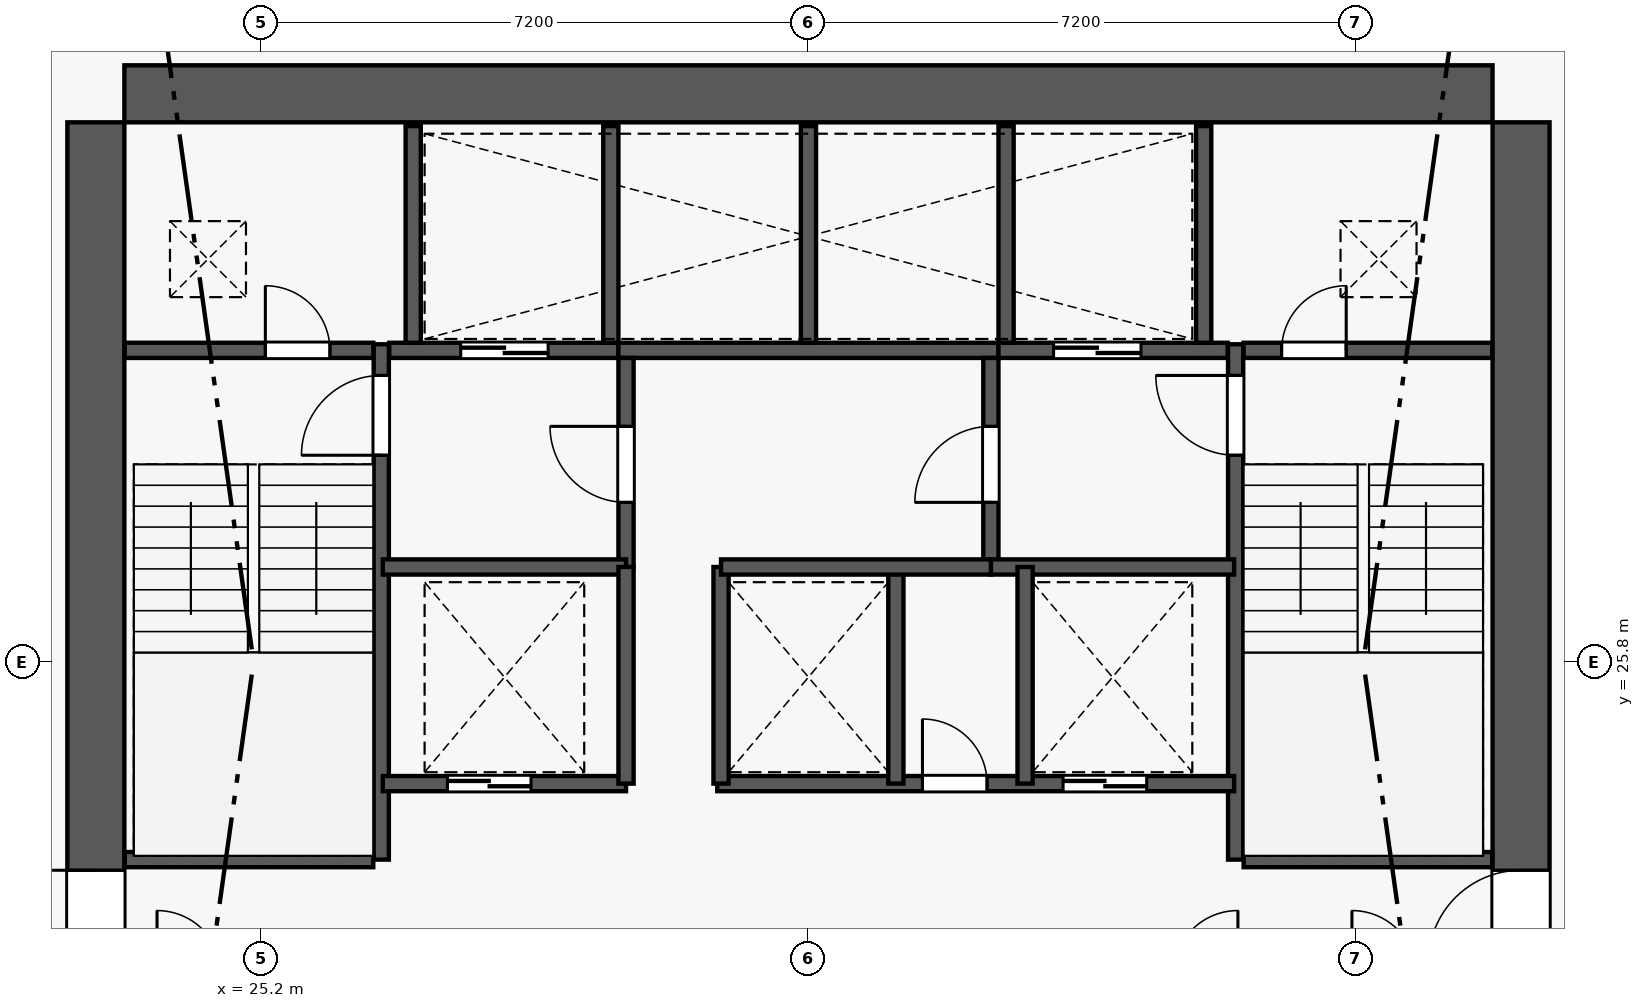
"""IFC4 building model, lengths in metres.
Left out: names, types, materials, properties, quantities, classifications, styles, units other than length and angle.
Written with IfcOpenShell. Run it as: python <this file> out.ifc"""

import sys

from ifc_helpers import new_model, si_unit, direction, frame, frame_2d, origin, origin_2d, place, context, subcontext, project, spatial, rectangle, extrude, element, fill, save


model = new_model("IFC4")
c1 = context("Model", 3, precision=1e-05, world=origin(), true_north=direction((0.0, 1.0)))
c2 = subcontext(c1, "Body", "Model", "MODEL_VIEW")
j1 = project(units=[si_unit("LENGTHUNIT", "METRE"), si_unit("PLANEANGLEUNIT", "RADIAN")], contexts=[c1])
p1 = place(None, origin())
s1 = spatial("IfcSite", under=j1, at=p1, CompositionType="ELEMENT")
p2 = place(p1, origin())
s2 = spatial("IfcBuilding", under=s1, at=p2, CompositionType="ELEMENT")
p3 = place(p2, frame((0.0, 0.0, 112.6)))
s3 = spatial("IfcBuildingStorey", under=s2, at=p3, CompositionType="ELEMENT", Elevation=112.6)
for number, where, z_axis, x_axis in (
    (1, (41.775, 33.275, 0.0), (0.0, 0.0, 1.0), (1.0, 0.0, 0.0)),
    (2, (23.025, 33.275, 0.0), (0.0, 0.0, 1.0), (1.0, 0.0, 0.0)),
):
    element("IfcColumn", number, at=place(p3, frame(where, z_axis=z_axis, x_axis=x_axis)), inside=s3, PredefinedType="COLUMN", context=c2, shape_type="SweptSolid", body=[
        extrude(rectangle(XDim=0.75, YDim=0.75, at=origin_2d()), origin(), (0.0, 0.0, 1.0), 3.55),
    ])
p4 = place(p3, frame((23.4, 33.275, 0.0), z_axis=(0.0, 0.0, 1.0), x_axis=(1.0, 0.0, 0.0)))
e3 = element("IfcWall", 3, at=p4, inside=s3, PredefinedType="SHEAR", context=c2, shape_type="SweptSolid", body=[
    extrude(rectangle(XDim=18.0, YDim=0.75, at=frame_2d((9.0, 0.0))), origin(), (0.0, 0.0, 1.0), 3.34),
])
p5 = place(p3, frame((23.025, 18.9, 0.0), z_axis=(0.0, 0.0, 1.0), x_axis=(0.0, 1.0, 0.0)))
e4 = element("IfcWall", 4, at=p5, inside=s3, PredefinedType="SHEAR", context=c2, shape_type="SweptSolid", body=[
    extrude(rectangle(XDim=14.0, YDim=0.75, at=frame_2d((7.0, 0.0))), origin(), (0.0, 0.0, 1.0), 3.34),
])
p6 = place(p5, frame((2.94, 0.0, 0.0)))
e5 = element("IfcOpeningElement", 5, at=p6, cuts=e4, PredefinedType="OPENING", context=c2, shape_type="SweptSolid", body=[
    extrude(rectangle(XDim=1.22, YDim=2.25, at=frame_2d((0.61, 1.125))), frame((0.0, 0.385, 0.0), z_axis=(0.0, -1.0, 0.0), x_axis=(1.0, 0.0, 0.0)), (0.0, 0.0, 1.0), 0.77),
])
p7 = place(p3, frame((41.775, 18.9, 0.0), z_axis=(0.0, 0.0, 1.0), x_axis=(0.0, 1.0, 0.0)))
e6 = element("IfcWall", 6, at=p7, inside=s3, PredefinedType="SHEAR", context=c2, shape_type="SweptSolid", body=[
    extrude(rectangle(XDim=14.0, YDim=0.75, at=frame_2d((7.0, 0.0))), origin(), (0.0, 0.0, 1.0), 3.34),
])
p8 = place(p7, frame((2.94, 0.0, 0.0)))
e7 = element("IfcOpeningElement", 7, at=p8, cuts=e6, PredefinedType="OPENING", context=c2, shape_type="SweptSolid", body=[
    extrude(rectangle(XDim=1.22, YDim=2.25, at=frame_2d((0.61, 1.125))), frame((0.0, 0.385, 0.0), z_axis=(0.0, -1.0, 0.0), x_axis=(1.0, 0.0, 0.0)), (0.0, 0.0, 1.0), 0.77),
])
p9 = place(p3, frame((26.78, 23.2, 0.0), z_axis=(0.0, 0.0, 1.0), x_axis=(0.0, 1.0, 0.0)))
e8 = element("IfcWall", 8, at=p9, inside=s3, PredefinedType="SHEAR", context=c2, shape_type="SweptSolid", body=[
    extrude(rectangle(XDim=6.78, YDim=0.2, at=frame_2d((3.39, 0.0))), origin(), (0.0, 0.0, 1.0), 3.55),
])
p10 = place(p9, frame((5.32, 0.0, 0.0)))
e9 = element("IfcOpeningElement", 9, at=p10, cuts=e8, PredefinedType="OPENING", context=c2, shape_type="SweptSolid", body=[
    extrude(rectangle(XDim=1.05, YDim=2.15, at=frame_2d((0.525, 1.075))), frame((0.0, 0.11, 0.0), z_axis=(0.0, -1.0, 0.0), x_axis=(1.0, 0.0, 0.0)), (0.0, 0.0, 1.0), 0.22),
])
p11 = place(p3, frame((23.405, 23.2, 0.0), z_axis=(0.0, 0.0, 1.0), x_axis=(1.0, 0.0, 0.0)))
e10 = element("IfcWall", 10, at=p11, inside=s3, PredefinedType="PLUMBINGWALL", context=c2, shape_type="SweptSolid", body=[
    extrude(rectangle(XDim=3.27, YDim=0.2, at=frame_2d((1.635, 0.0))), origin(), (0.0, 0.0, 1.0), 3.34),
])
p12 = place(p3, frame((38.02, 23.2, 0.0), z_axis=(0.0, 0.0, 1.0), x_axis=(0.0, 1.0, 0.0)))
e11 = element("IfcWall", 11, at=p12, inside=s3, PredefinedType="SHEAR", context=c2, shape_type="SweptSolid", body=[
    extrude(rectangle(XDim=6.78, YDim=0.2, at=frame_2d((3.39, 0.0))), origin(), (0.0, 0.0, 1.0), 3.55),
])
p13 = place(p12, frame((5.32, 0.0, 0.0)))
e12 = element("IfcOpeningElement", 12, at=p13, cuts=e11, PredefinedType="OPENING", context=c2, shape_type="SweptSolid", body=[
    extrude(rectangle(XDim=1.05, YDim=2.15, at=frame_2d((0.525, 1.075))), frame((0.0, 0.11, 0.0), z_axis=(0.0, -1.0, 0.0), x_axis=(1.0, 0.0, 0.0)), (0.0, 0.0, 1.0), 0.22),
])
p14 = place(p3, frame((38.125, 23.2, 0.0), z_axis=(0.0, 0.0, 1.0), x_axis=(1.0, 0.0, 0.0)))
e13 = element("IfcWall", 13, at=p14, inside=s3, PredefinedType="PLUMBINGWALL", context=c2, shape_type="SweptSolid", body=[
    extrude(rectangle(XDim=3.27, YDim=0.2, at=frame_2d((1.635, 0.0))), origin(), (0.0, 0.0, 1.0), 3.34),
])
p15 = place(p3, frame((23.405, 29.9, 0.0), z_axis=(0.0, 0.0, 1.0), x_axis=(1.0, 0.0, 0.0)))
e14 = element("IfcWall", 14, at=p15, inside=s3, PredefinedType="PLUMBINGWALL", context=c2, shape_type="SweptSolid", body=[
    extrude(rectangle(XDim=3.27, YDim=0.2, at=frame_2d((1.635, 0.0))), origin(), (0.0, 0.0, 1.0), 3.34),
])
p16 = place(p15, frame((1.85, 0.0, 0.0)))
e15 = element("IfcOpeningElement", 15, at=p16, cuts=e14, PredefinedType="OPENING", context=c2, shape_type="SweptSolid", body=[
    extrude(rectangle(XDim=0.85, YDim=2.05, at=frame_2d((0.425, 1.025))), frame((0.0, 0.11, 0.0), z_axis=(0.0, -1.0, 0.0), x_axis=(1.0, 0.0, 0.0)), (0.0, 0.0, 1.0), 0.22),
])
p17 = place(p3, frame((26.885, 29.9, 0.0), z_axis=(0.0, 0.0, 1.0), x_axis=(1.0, 0.0, 0.0)))
e16 = element("IfcWall", 16, at=p17, inside=s3, PredefinedType="PLUMBINGWALL", context=c2, shape_type="SweptSolid", body=[
    extrude(rectangle(XDim=3.015, YDim=0.2, at=frame_2d((1.507, 0.0))), origin(), (0.0, 0.0, 1.0), 3.34),
])
p18 = place(p17, frame((0.94, 0.0, 0.0)))
e17 = element("IfcOpeningElement", 17, at=p18, cuts=e16, PredefinedType="OPENING", context=c2, shape_type="SweptSolid", body=[
    extrude(rectangle(XDim=1.15, YDim=2.2, at=frame_2d((0.575, 1.1))), frame((0.0, 0.11, 0.0), z_axis=(0.0, -1.0, 0.0), x_axis=(1.0, 0.0, 0.0)), (0.0, 0.0, 1.0), 0.22),
])
p19 = place(p3, frame((29.9, 29.9, 0.0), z_axis=(0.0, 0.0, 1.0), x_axis=(1.0, 0.0, 0.0)))
e18 = element("IfcWall", 18, at=p19, inside=s3, PredefinedType="PLUMBINGWALL", context=c2, shape_type="SweptSolid", body=[
    extrude(rectangle(XDim=5.0, YDim=0.2, at=frame_2d((2.5, 0.0))), origin(), (0.0, 0.0, 1.0), 3.34),
])
p20 = place(p3, frame((34.9, 29.9, 0.0), z_axis=(0.0, 0.0, 1.0), x_axis=(1.0, 0.0, 0.0)))
e19 = element("IfcWall", 19, at=p20, inside=s3, PredefinedType="PLUMBINGWALL", context=c2, shape_type="SweptSolid", body=[
    extrude(rectangle(XDim=3.015, YDim=0.2, at=frame_2d((1.508, 0.0))), origin(), (0.0, 0.0, 1.0), 3.34),
])
p21 = place(p20, frame((0.725, 0.0, 0.0)))
e20 = element("IfcOpeningElement", 20, at=p21, cuts=e19, PredefinedType="OPENING", context=c2, shape_type="SweptSolid", body=[
    extrude(rectangle(XDim=1.15, YDim=2.2, at=frame_2d((0.575, 1.1))), frame((0.0, 0.11, 0.0), z_axis=(0.0, -1.0, 0.0), x_axis=(1.0, 0.0, 0.0)), (0.0, 0.0, 1.0), 0.22),
])
p22 = place(p3, frame((38.125, 29.9, 0.0), z_axis=(0.0, 0.0, 1.0), x_axis=(1.0, 0.0, 0.0)))
e21 = element("IfcWall", 21, at=p22, inside=s3, PredefinedType="PLUMBINGWALL", context=c2, shape_type="SweptSolid", body=[
    extrude(rectangle(XDim=3.27, YDim=0.2, at=frame_2d((1.635, 0.0))), origin(), (0.0, 0.0, 1.0), 3.34),
])
p23 = place(p22, frame((0.5, 0.0, 0.0)))
e22 = element("IfcOpeningElement", 22, at=p23, cuts=e21, PredefinedType="OPENING", context=c2, shape_type="SweptSolid", body=[
    extrude(rectangle(XDim=0.85, YDim=2.05, at=frame_2d((0.425, 1.025))), frame((0.0, 0.11, 0.0), z_axis=(0.0, -1.0, 0.0), x_axis=(1.0, 0.0, 0.0)), (0.0, 0.0, 1.0), 0.22),
])
for number, where, z_axis, x_axis in (
    (23, (27.2, 30.0, 0.0), (0.0, 0.0, 1.0), (0.0, 1.0, 0.0)),
    (24, (29.8, 30.0, 0.0), (0.0, 0.0, 1.0), (0.0, 1.0, 0.0)),
    (25, (32.4, 30.0, 0.0), (0.0, 0.0, 1.0), (0.0, 1.0, 0.0)),
    (26, (35.0, 30.0, 0.0), (0.0, 0.0, 1.0), (0.0, 1.0, 0.0)),
    (27, (37.6, 30.0, 0.0), (0.0, 0.0, 1.0), (0.0, 1.0, 0.0)),
):
    element("IfcWall", number, at=place(p3, frame(where, z_axis=z_axis, x_axis=x_axis)), inside=s3, PredefinedType="PLUMBINGWALL", context=c2, shape_type="SweptSolid", body=[
        extrude(rectangle(XDim=2.85, YDim=0.2, at=frame_2d((1.425, 0.0))), origin(), (0.0, 0.0, 1.0), 3.34),
    ])
p24 = place(p3, frame((30.0, 27.05, 0.0), z_axis=(0.0, 0.0, 1.0), x_axis=(0.0, 1.0, 0.0)))
e28 = element("IfcWall", 28, at=p24, inside=s3, PredefinedType="PLUMBINGWALL", context=c2, shape_type="SweptSolid", body=[
    extrude(rectangle(XDim=2.75, YDim=0.2, at=frame_2d((1.375, 0.0))), origin(), (0.0, 0.0, 1.0), 3.34),
])
p25 = place(p24, frame((0.85, 0.0, 0.0)))
e29 = element("IfcOpeningElement", 29, at=p25, cuts=e28, PredefinedType="OPENING", context=c2, shape_type="SweptSolid", body=[
    extrude(rectangle(XDim=1.0, YDim=2.15, at=frame_2d((0.5, 1.075))), frame((0.0, 0.11, 0.0), z_axis=(0.0, -1.0, 0.0), x_axis=(1.0, 0.0, 0.0)), (0.0, 0.0, 1.0), 0.22),
])
p26 = place(p3, frame((26.8, 27.05, 0.0), z_axis=(0.0, 0.0, 1.0), x_axis=(1.0, 0.0, 0.0)))
e30 = element("IfcWall", 30, at=p26, inside=s3, PredefinedType="PLUMBINGWALL", context=c2, shape_type="SweptSolid", body=[
    extrude(rectangle(XDim=3.2, YDim=0.2, at=frame_2d((1.6, 0.0))), origin(), (0.0, 0.0, 1.0), 3.34),
])
p27 = place(p3, frame((34.8, 27.05, 0.0), z_axis=(0.0, 0.0, 1.0), x_axis=(0.0, 1.0, 0.0)))
e31 = element("IfcWall", 31, at=p27, inside=s3, PredefinedType="PLUMBINGWALL", context=c2, shape_type="SweptSolid", body=[
    extrude(rectangle(XDim=2.75, YDim=0.2, at=frame_2d((1.375, 0.0))), origin(), (0.0, 0.0, 1.0), 3.34),
])
p28 = place(p27, frame((0.85, 0.0, 0.0)))
e32 = element("IfcOpeningElement", 32, at=p28, cuts=e31, PredefinedType="OPENING", context=c2, shape_type="SweptSolid", body=[
    extrude(rectangle(XDim=1.0, YDim=2.15, at=frame_2d((0.5, 1.075))), frame((0.0, 0.11, 0.0), z_axis=(0.0, -1.0, 0.0), x_axis=(1.0, 0.0, 0.0)), (0.0, 0.0, 1.0), 0.22),
])
p29 = place(p3, frame((34.8, 27.05, 0.0), z_axis=(0.0, 0.0, 1.0), x_axis=(1.0, 0.0, 0.0)))
e33 = element("IfcWall", 33, at=p29, inside=s3, PredefinedType="PLUMBINGWALL", context=c2, shape_type="SweptSolid", body=[
    extrude(rectangle(XDim=3.2, YDim=0.2, at=frame_2d((1.6, 0.0))), origin(), (0.0, 0.0, 1.0), 3.34),
])
p30 = place(p3, frame((26.8, 24.2, 0.0), z_axis=(0.0, 0.0, 1.0), x_axis=(1.0, 0.0, 0.0)))
e34 = element("IfcWall", 34, at=p30, inside=s3, PredefinedType="PLUMBINGWALL", context=c2, shape_type="SweptSolid", body=[
    extrude(rectangle(XDim=3.2, YDim=0.2, at=frame_2d((1.6, 0.0))), origin(), (0.0, 0.0, 1.0), 3.34),
])
p31 = place(p30, frame((0.85, 0.0, 0.0)))
e35 = element("IfcOpeningElement", 35, at=p31, cuts=e34, PredefinedType="OPENING", context=c2, shape_type="SweptSolid", body=[
    extrude(rectangle(XDim=1.1, YDim=2.2, at=frame_2d((0.55, 1.1))), frame((0.0, 0.11, 0.0), z_axis=(0.0, -1.0, 0.0), x_axis=(1.0, 0.0, 0.0)), (0.0, 0.0, 1.0), 0.22),
])
p32 = place(p3, frame((30.0, 24.2, 0.0), z_axis=(0.0, 0.0, 1.0), x_axis=(0.0, 1.0, 0.0)))
e36 = element("IfcWall", 36, at=p32, inside=s3, PredefinedType="PLUMBINGWALL", context=c2, shape_type="SweptSolid", body=[
    extrude(rectangle(XDim=2.85, YDim=0.2, at=frame_2d((1.425, 0.0))), origin(), (0.0, 0.0, 1.0), 3.34),
])
p33 = place(p3, frame((31.2, 24.2, 0.0), z_axis=(0.0, 0.0, 1.0), x_axis=(1.0, 0.0, 0.0)))
e37 = element("IfcWall", 37, at=p33, inside=s3, PredefinedType="PLUMBINGWALL", context=c2, shape_type="SweptSolid", body=[
    extrude(rectangle(XDim=6.8, YDim=0.2, at=frame_2d((3.4, 0.0))), origin(), (0.0, 0.0, 1.0), 3.34),
])
p34 = place(p33, frame((2.7, 0.0, 0.0)))
e38 = element("IfcOpeningElement", 38, at=p34, cuts=e37, PredefinedType="OPENING", context=c2, shape_type="SweptSolid", body=[
    extrude(rectangle(XDim=0.85, YDim=2.05, at=frame_2d((0.425, 1.025))), frame((0.0, 0.11, 0.0), z_axis=(0.0, -1.0, 0.0), x_axis=(1.0, 0.0, 0.0)), (0.0, 0.0, 1.0), 0.22),
])
p35 = place(p33, frame((4.55, 0.0, 0.0)))
e39 = element("IfcOpeningElement", 39, at=p35, cuts=e37, PredefinedType="OPENING", context=c2, shape_type="SweptSolid", body=[
    extrude(rectangle(XDim=1.1, YDim=2.2, at=frame_2d((0.55, 1.1))), frame((0.0, 0.11, 0.0), z_axis=(0.0, -1.0, 0.0), x_axis=(1.0, 0.0, 0.0)), (0.0, 0.0, 1.0), 0.22),
])
for number, where, z_axis, x_axis in (
    (40, (31.25, 24.2, 0.0), (0.0, 0.0, 1.0), (0.0, 1.0, 0.0)),
    (41, (33.55, 24.2, 0.0), (0.0, 0.0, 1.0), (0.0, 1.0, 0.0)),
    (42, (35.25, 24.2, 0.0), (0.0, 0.0, 1.0), (0.0, 1.0, 0.0)),
):
    element("IfcWall", number, at=place(p3, frame(where, z_axis=z_axis, x_axis=x_axis)), inside=s3, PredefinedType="PLUMBINGWALL", context=c2, shape_type="SweptSolid", body=[
        extrude(rectangle(XDim=2.85, YDim=0.2, at=frame_2d((1.425, 0.0))), origin(), (0.0, 0.0, 1.0), 3.34),
    ])
p36 = place(p3, frame((31.25, 27.05, 0.0), z_axis=(0.0, 0.0, 1.0), x_axis=(1.0, 0.0, 0.0)))
e43 = element("IfcWall", 43, at=p36, inside=s3, PredefinedType="PLUMBINGWALL", context=c2, shape_type="SweptSolid", body=[
    extrude(rectangle(XDim=3.55, YDim=0.2, at=frame_2d((1.775, 0.0))), origin(), (0.0, 0.0, 1.0), 3.34),
])
p37 = place(p6, origin())
e44 = element("IfcDoor", 44, at=p37, inside=s3, OperationType="SINGLE_SWING_RIGHT", PredefinedType="DOOR", context=c2, shape_type="SweptSolid", body=[
    extrude(rectangle(XDim=1.22, YDim=2.25, at=frame_2d((0.61, 1.125))), frame((0.0, 0.025, 0.0), z_axis=(0.0, -1.0, 0.0), x_axis=(1.0, 0.0, 0.0)), (0.0, 0.0, 1.0), 0.05),
])
fill(e5, e44)
p38 = place(p8, origin())
e45 = element("IfcDoor", 45, at=p38, inside=s3, OperationType="SINGLE_SWING_LEFT", PredefinedType="DOOR", context=c2, shape_type="SweptSolid", body=[
    extrude(rectangle(XDim=1.22, YDim=2.25, at=frame_2d((0.61, 1.125))), frame((0.0, 0.025, 0.0), z_axis=(0.0, -1.0, 0.0), x_axis=(1.0, 0.0, 0.0)), (0.0, 0.0, 1.0), 0.05),
])
fill(e7, e45)
p39 = place(p10, origin())
e46 = element("IfcDoor", 46, at=p39, inside=s3, OperationType="SINGLE_SWING_LEFT", PredefinedType="DOOR", context=c2, shape_type="SweptSolid", body=[
    extrude(rectangle(XDim=1.05, YDim=2.15, at=frame_2d((0.525, 1.075))), frame((0.0, 0.025, 0.0), z_axis=(0.0, -1.0, 0.0), x_axis=(1.0, 0.0, 0.0)), (0.0, 0.0, 1.0), 0.05),
])
fill(e9, e46)
p40 = place(p13, origin())
e47 = element("IfcDoor", 47, at=p40, inside=s3, OperationType="SINGLE_SWING_RIGHT", PredefinedType="DOOR", context=c2, shape_type="SweptSolid", body=[
    extrude(rectangle(XDim=1.05, YDim=2.15, at=frame_2d((0.525, 1.075))), frame((0.0, 0.025, 0.0), z_axis=(0.0, -1.0, 0.0), x_axis=(1.0, 0.0, 0.0)), (0.0, 0.0, 1.0), 0.05),
])
fill(e12, e47)
p41 = place(p16, origin())
e48 = element("IfcDoor", 48, at=p41, inside=s3, OperationType="SINGLE_SWING_LEFT", PredefinedType="DOOR", context=c2, shape_type="SweptSolid", body=[
    extrude(rectangle(XDim=0.85, YDim=2.05, at=frame_2d((0.425, 1.025))), frame((0.0, 0.025, 0.0), z_axis=(0.0, -1.0, 0.0), x_axis=(1.0, 0.0, 0.0)), (0.0, 0.0, 1.0), 0.05),
])
fill(e15, e48)
p42 = place(p23, origin())
e49 = element("IfcDoor", 49, at=p42, inside=s3, OperationType="SINGLE_SWING_RIGHT", PredefinedType="DOOR", context=c2, shape_type="SweptSolid", body=[
    extrude(rectangle(XDim=0.85, YDim=2.05, at=frame_2d((0.425, 1.025))), frame((0.0, 0.025, 0.0), z_axis=(0.0, -1.0, 0.0), x_axis=(1.0, 0.0, 0.0)), (0.0, 0.0, 1.0), 0.05),
])
fill(e22, e49)
p43 = place(p18, origin())
e50 = element("IfcDoor", 50, at=p43, inside=s3, OperationType="DOUBLE_DOOR_SLIDING", PredefinedType="DOOR", context=c2, shape_type="SweptSolid", body=[
    extrude(rectangle(XDim=1.15, YDim=2.2, at=frame_2d((0.575, 1.1))), frame((0.0, 0.025, 0.0), z_axis=(0.0, -1.0, 0.0), x_axis=(1.0, 0.0, 0.0)), (0.0, 0.0, 1.0), 0.05),
])
fill(e17, e50)
p44 = place(p21, origin())
e51 = element("IfcDoor", 51, at=p44, inside=s3, OperationType="DOUBLE_DOOR_SLIDING", PredefinedType="DOOR", context=c2, shape_type="SweptSolid", body=[
    extrude(rectangle(XDim=1.15, YDim=2.2, at=frame_2d((0.575, 1.1))), frame((0.0, 0.025, 0.0), z_axis=(0.0, -1.0, 0.0), x_axis=(1.0, 0.0, 0.0)), (0.0, 0.0, 1.0), 0.05),
])
fill(e20, e51)
p45 = place(p25, origin())
e52 = element("IfcDoor", 52, at=p45, inside=s3, OperationType="SINGLE_SWING_RIGHT", PredefinedType="DOOR", context=c2, shape_type="SweptSolid", body=[
    extrude(rectangle(XDim=1.0, YDim=2.15, at=frame_2d((0.5, 1.075))), frame((0.0, 0.025, 0.0), z_axis=(0.0, -1.0, 0.0), x_axis=(1.0, 0.0, 0.0)), (0.0, 0.0, 1.0), 0.05),
])
fill(e29, e52)
p46 = place(p28, origin())
e53 = element("IfcDoor", 53, at=p46, inside=s3, OperationType="SINGLE_SWING_LEFT", PredefinedType="DOOR", context=c2, shape_type="SweptSolid", body=[
    extrude(rectangle(XDim=1.0, YDim=2.15, at=frame_2d((0.5, 1.075))), frame((0.0, 0.025, 0.0), z_axis=(0.0, -1.0, 0.0), x_axis=(1.0, 0.0, 0.0)), (0.0, 0.0, 1.0), 0.05),
])
fill(e32, e53)
p47 = place(p31, origin())
e54 = element("IfcDoor", 54, at=p47, inside=s3, OperationType="DOUBLE_DOOR_SLIDING", PredefinedType="DOOR", context=c2, shape_type="SweptSolid", body=[
    extrude(rectangle(XDim=1.1, YDim=2.2, at=frame_2d((0.55, 1.1))), frame((0.0, 0.025, 0.0), z_axis=(0.0, -1.0, 0.0), x_axis=(1.0, 0.0, 0.0)), (0.0, 0.0, 1.0), 0.05),
])
fill(e35, e54)
p48 = place(p34, origin())
e55 = element("IfcDoor", 55, at=p48, inside=s3, OperationType="SINGLE_SWING_LEFT", PredefinedType="DOOR", context=c2, shape_type="SweptSolid", body=[
    extrude(rectangle(XDim=0.85, YDim=2.05, at=frame_2d((0.425, 1.025))), frame((0.0, 0.025, 0.0), z_axis=(0.0, -1.0, 0.0), x_axis=(1.0, 0.0, 0.0)), (0.0, 0.0, 1.0), 0.05),
])
fill(e38, e55)
p49 = place(p35, origin())
e56 = element("IfcDoor", 56, at=p49, inside=s3, OperationType="DOUBLE_DOOR_SLIDING", PredefinedType="DOOR", context=c2, shape_type="SweptSolid", body=[
    extrude(rectangle(XDim=1.1, YDim=2.2, at=frame_2d((0.55, 1.1))), frame((0.0, 0.025, 0.0), z_axis=(0.0, -1.0, 0.0), x_axis=(1.0, 0.0, 0.0)), (0.0, 0.0, 1.0), 0.05),
])
fill(e39, e56)
save(model, sys.argv[1])
